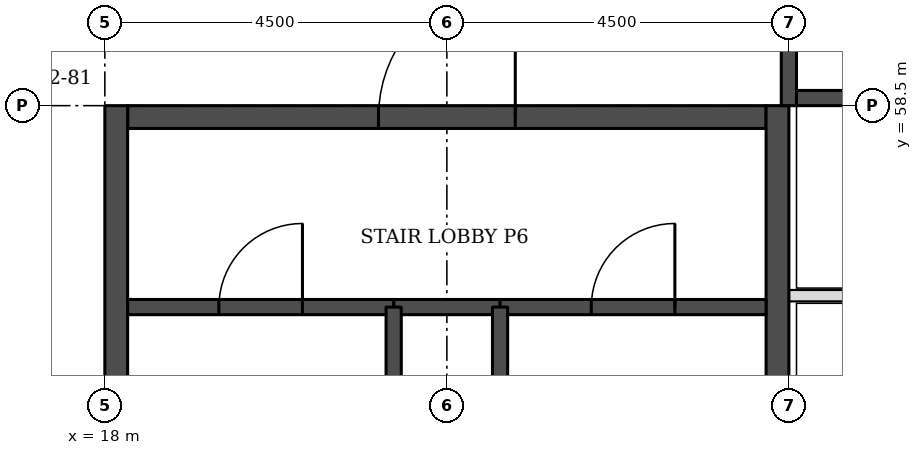
"""IFC4 building model, lengths in metres.
Left out: names, types, materials, properties, quantities, classifications, styles, units other than length and angle.
Written with IfcOpenShell. Run it as: python <this file> out.ifc"""

import sys

from ifc_helpers import new_model, si_unit, direction, frame, frame_2d, origin, place, context, subcontext, project, spatial, rectangle, extrude, element, fill, save


model = new_model("IFC4")
c1 = context("Model", 3, precision=1e-05, world=origin(), true_north=direction((0.0, 1.0)))
c2 = subcontext(c1, "Body", "Model", "MODEL_VIEW")
j1 = project(units=[si_unit("LENGTHUNIT", "METRE"), si_unit("PLANEANGLEUNIT", "RADIAN")], contexts=[c1])
p1 = place(None, origin())
s1 = spatial("IfcSite", under=j1, at=p1, CompositionType="ELEMENT")
p2 = place(p1, origin())
s2 = spatial("IfcBuilding", under=s1, at=p2, CompositionType="ELEMENT")
p3 = place(p2, frame((0.0, 0.0, 52.8)))
s3 = spatial("IfcBuildingStorey", under=s2, at=p3, CompositionType="ELEMENT", Elevation=52.8)
p4 = place(p3, frame((18.3, 58.35, 0.0), z_axis=(0.0, 0.0, 1.0), x_axis=(1.0, 0.0, 0.0)))
e1 = element("IfcWall", 1, at=p4, inside=s3, PredefinedType="SHEAR", context=c2, shape_type="SweptSolid", body=[
    extrude(rectangle(XDim=8.4, YDim=0.3, at=frame_2d((4.2, 0.0))), origin(), (0.0, 0.0, 1.0), 3.3),
])
p5 = place(p4, frame((3.3, 0.0, 0.0)))
e2 = element("IfcOpeningElement", 2, at=p5, cuts=e1, PredefinedType="OPENING", context=c2, shape_type="SweptSolid", body=[
    extrude(rectangle(XDim=1.8, YDim=2.1, at=frame_2d((0.9, 1.05))), frame((0.0, 0.16, 0.0), z_axis=(0.0, -1.0, 0.0), x_axis=(1.0, 0.0, 0.0)), (0.0, 0.0, 1.0), 0.32),
])
for number, where, z_axis, x_axis in (
    (3, (18.15, 49.5, 0.0), (0.0, 0.0, 1.0), (0.0, 1.0, 0.0)),
    (4, (26.85, 49.5, 0.0), (0.0, 0.0, 1.0), (0.0, 1.0, 0.0)),
):
    element("IfcWall", number, at=place(p3, frame(where, z_axis=z_axis, x_axis=x_axis)), inside=s3, PredefinedType="SHEAR", context=c2, shape_type="SweptSolid", body=[
        extrude(rectangle(XDim=9.0, YDim=0.3, at=frame_2d((4.5, 0.0))), origin(), (0.0, 0.0, 1.0), 3.3),
    ])
p6 = place(p3, frame((17.73, 63.826, 0.0), z_axis=(0.0, 0.0, 1.0), x_axis=(-0.707106781187, -0.707106781187, 0.0)))
e5 = element("IfcWall", 5, at=p6, inside=s3, PredefinedType="STANDARD", context=c2, shape_type="SweptSolid", body=[
    extrude(rectangle(XDim=7.151, YDim=0.35, at=frame_2d((3.576, 0.0))), origin(), (0.0, 0.0, 1.0), 3.055),
])
p7 = place(p6, frame((1.926, 0.0, 0.8)))
e6 = element("IfcOpeningElement", 6, at=p7, cuts=e5, PredefinedType="OPENING", context=c2, shape_type="SweptSolid", body=[
    extrude(rectangle(XDim=3.3, YDim=1.5, at=frame_2d((1.65, 0.75))), frame((0.0, 0.185, 0.0), z_axis=(0.0, -1.0, 0.0), x_axis=(1.0, 0.0, 0.0)), (0.0, 0.0, 1.0), 0.37),
])
p8 = place(p3, frame((27.0, 56.0, 0.0), z_axis=(0.0, 0.0, 1.0), x_axis=(1.0, 0.0, 0.0)))
e7 = element("IfcWall", 7, at=p8, inside=s3, PredefinedType="PARTITIONING", context=c2, shape_type="SweptSolid", body=[
    extrude(rectangle(XDim=16.0, YDim=0.15, at=frame_2d((8.0, 0.0))), origin(), (0.0, 0.0, 1.0), 3.08),
])
p9 = place(p8, frame((5.6, 0.0, 0.0)))
e8 = element("IfcOpeningElement", 8, at=p9, cuts=e7, PredefinedType="OPENING", context=c2, shape_type="SweptSolid", body=[
    extrude(rectangle(XDim=1.0, YDim=2.1, at=frame_2d((0.5, 1.05))), frame((0.0, 0.085, 0.0), z_axis=(0.0, -1.0, 0.0), x_axis=(1.0, 0.0, 0.0)), (0.0, 0.0, 1.0), 0.17),
])
p10 = place(p3, frame((27.0, 58.5, 0.0), z_axis=(0.0, 0.0, 1.0), x_axis=(0.0, 1.0, 0.0)))
e9 = element("IfcWall", 9, at=p10, inside=s3, PredefinedType="SOLIDWALL", context=c2, shape_type="SweptSolid", body=[
    extrude(rectangle(XDim=3.9, YDim=0.2, at=frame_2d((1.95, 0.0))), origin(), (0.0, 0.0, 1.0), 3.08),
])
p11 = place(p3, frame((27.1, 58.6, 0.0), z_axis=(0.0, 0.0, 1.0), x_axis=(1.0, 0.0, 0.0)))
e10 = element("IfcWall", 10, at=p11, inside=s3, PredefinedType="SOLIDWALL", context=c2, shape_type="SweptSolid", body=[
    extrude(rectangle(XDim=3.1, YDim=0.2, at=frame_2d((1.55, 0.0))), origin(), (0.0, 0.0, 1.0), 3.08),
])
p12 = place(p3, frame((21.8, 55.85, 0.0), z_axis=(0.0, 0.0, 1.0), x_axis=(1.0, 0.0, 0.0)))
e11 = element("IfcWall", 11, at=p12, inside=s3, PredefinedType="SOLIDWALL", context=c2, shape_type="SweptSolid", body=[
    extrude(rectangle(XDim=1.4, YDim=0.2, at=frame_2d((0.7, 0.0))), origin(), (0.0, 0.0, 1.0), 3.08),
])
p13 = place(p3, frame((18.3, 55.85, 0.0), z_axis=(0.0, 0.0, 1.0), x_axis=(1.0, 0.0, 0.0)))
e12 = element("IfcWall", 12, at=p13, inside=s3, PredefinedType="SOLIDWALL", context=c2, shape_type="SweptSolid", body=[
    extrude(rectangle(XDim=3.5, YDim=0.2, at=frame_2d((1.75, 0.0))), origin(), (0.0, 0.0, 1.0), 3.08),
])
p14 = place(p13, frame((1.2, 0.0, 0.0)))
e13 = element("IfcOpeningElement", 13, at=p14, cuts=e12, PredefinedType="OPENING", context=c2, shape_type="SweptSolid", body=[
    extrude(rectangle(XDim=1.1, YDim=2.1, at=frame_2d((0.55, 1.05))), frame((0.0, 0.11, 0.0), z_axis=(0.0, -1.0, 0.0), x_axis=(1.0, 0.0, 0.0)), (0.0, 0.0, 1.0), 0.22),
])
p15 = place(p3, frame((23.2, 55.85, 0.0), z_axis=(0.0, 0.0, 1.0), x_axis=(1.0, 0.0, 0.0)))
e14 = element("IfcWall", 14, at=p15, inside=s3, PredefinedType="SOLIDWALL", context=c2, shape_type="SweptSolid", body=[
    extrude(rectangle(XDim=3.5, YDim=0.2, at=frame_2d((1.75, 0.0))), origin(), (0.0, 0.0, 1.0), 3.08),
])
p16 = place(p15, frame((1.2, 0.0, 0.0)))
e15 = element("IfcOpeningElement", 15, at=p16, cuts=e14, PredefinedType="OPENING", context=c2, shape_type="SweptSolid", body=[
    extrude(rectangle(XDim=1.1, YDim=2.1, at=frame_2d((0.55, 1.05))), frame((0.0, 0.11, 0.0), z_axis=(0.0, -1.0, 0.0), x_axis=(1.0, 0.0, 0.0)), (0.0, 0.0, 1.0), 0.22),
])
for number, where, z_axis, x_axis in (
    (16, (21.8, 49.8, 0.0), (0.0, 0.0, 1.0), (0.0, 1.0, 0.0)),
    (17, (23.2, 49.8, 0.0), (0.0, 0.0, 1.0), (0.0, 1.0, 0.0)),
):
    element("IfcWall", number, at=place(p3, frame(where, z_axis=z_axis, x_axis=x_axis)), inside=s3, PredefinedType="SOLIDWALL", context=c2, shape_type="SweptSolid", body=[
        extrude(rectangle(XDim=6.05, YDim=0.2, at=frame_2d((3.025, 0.0))), origin(), (0.0, 0.0, 1.0), 3.08),
    ])
p17 = place(p14, origin())
e18 = element("IfcDoor", 18, at=p17, inside=s3, OperationType="SINGLE_SWING_RIGHT", PredefinedType="DOOR", context=c2, shape_type="SweptSolid", body=[
    extrude(rectangle(XDim=1.1, YDim=2.1, at=frame_2d((0.55, 1.05))), frame((0.0, 0.025, 0.0), z_axis=(0.0, -1.0, 0.0), x_axis=(1.0, 0.0, 0.0)), (0.0, 0.0, 1.0), 0.05),
])
fill(e13, e18)
p18 = place(p16, origin())
e19 = element("IfcDoor", 19, at=p18, inside=s3, OperationType="SINGLE_SWING_RIGHT", PredefinedType="DOOR", context=c2, shape_type="SweptSolid", body=[
    extrude(rectangle(XDim=1.1, YDim=2.1, at=frame_2d((0.55, 1.05))), frame((0.0, 0.025, 0.0), z_axis=(0.0, -1.0, 0.0), x_axis=(1.0, 0.0, 0.0)), (0.0, 0.0, 1.0), 0.05),
])
fill(e15, e19)
p19 = place(p5, origin())
e20 = element("IfcDoor", 20, at=p19, inside=s3, OperationType="SINGLE_SWING_RIGHT", PredefinedType="DOOR", context=c2, shape_type="SweptSolid", body=[
    extrude(rectangle(XDim=1.8, YDim=2.1, at=frame_2d((0.9, 1.05))), frame((0.0, 0.025, 0.0), z_axis=(0.0, -1.0, 0.0), x_axis=(1.0, 0.0, 0.0)), (0.0, 0.0, 1.0), 0.05),
])
fill(e2, e20)
save(model, sys.argv[1])
